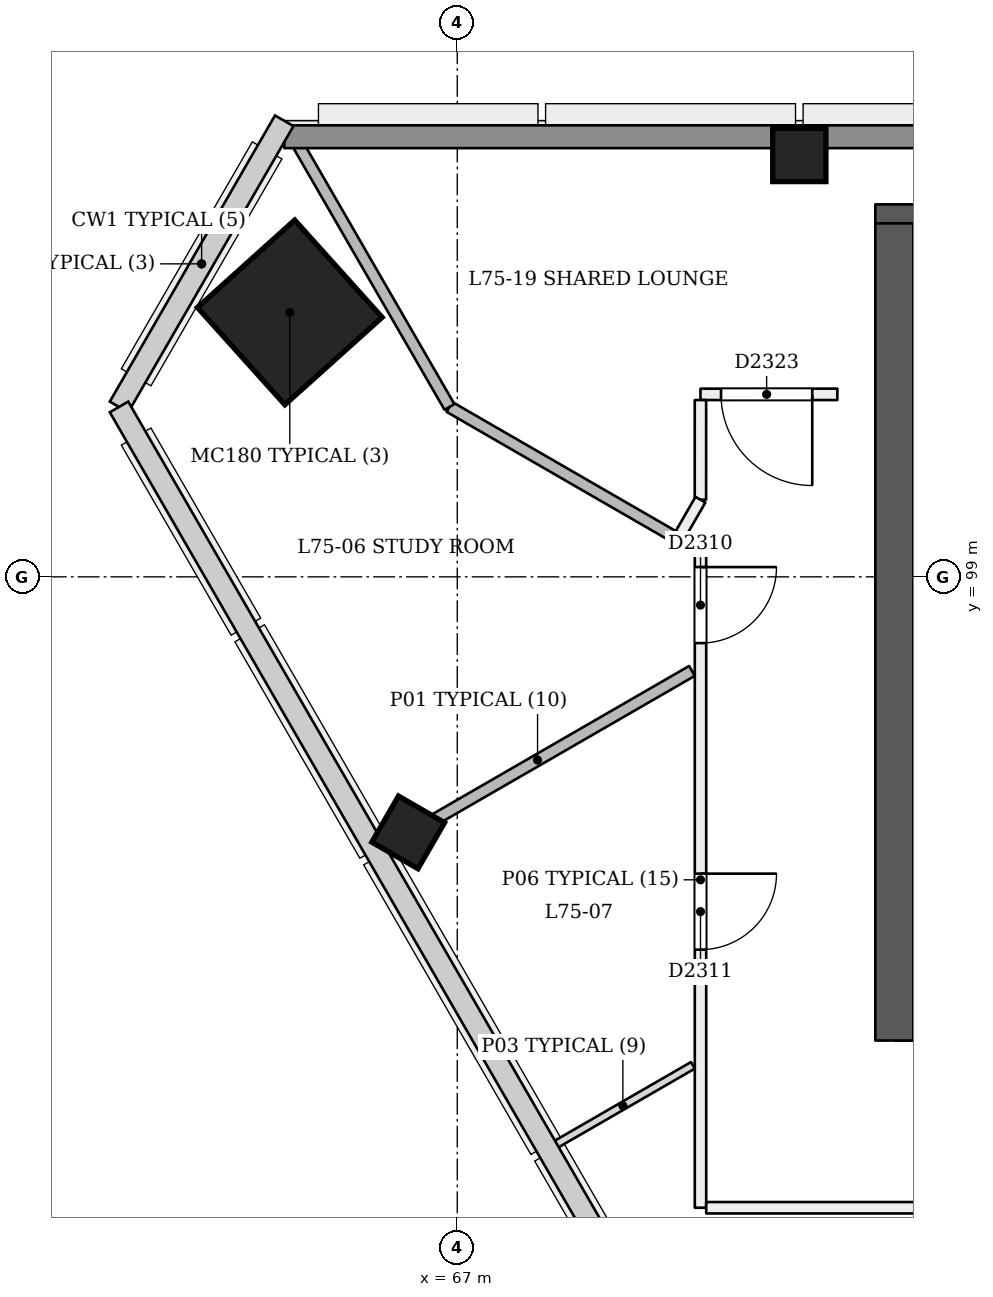
"""IFC4 building model, lengths in metres.
Left out: names, types, materials, properties, quantities, classifications, styles, units other than length and angle.
Written with IfcOpenShell. Run it as: python <this file> out.ifc"""

import sys

from ifc_helpers import new_model, si_unit, direction, frame, frame_2d, origin, origin_2d, place, context, subcontext, project, spatial, rectangle, extrude, element, fill, save


model = new_model("IFC4")
c1 = context("Model", 3, precision=1e-05, world=origin(), true_north=direction((0.0, 1.0)))
c2 = subcontext(c1, "Body", "Model", "MODEL_VIEW")
j1 = project(units=[si_unit("LENGTHUNIT", "METRE"), si_unit("PLANEANGLEUNIT", "RADIAN")], contexts=[c1])
p1 = place(None, origin())
s1 = spatial("IfcSite", under=j1, at=p1, CompositionType="ELEMENT")
p2 = place(p1, origin())
s2 = spatial("IfcBuilding", under=s1, at=p2, CompositionType="ELEMENT")
p3 = place(p2, frame((0.0, 0.0, 291.4)))
s3 = spatial("IfcBuildingStorey", under=s2, at=p3, CompositionType="ELEMENT", Elevation=291.4)
p4 = place(p3, frame((72.75, 93.15, 0.0), z_axis=(0.0, 0.0, 1.0), x_axis=(1.0, 0.0, 0.0)))
e1 = element("IfcWall", 1, at=p4, inside=s3, PredefinedType="SHEAR", context=c2, shape_type="SweptSolid", body=[
    extrude(rectangle(XDim=24.75, YDim=0.5, at=frame_2d((12.375, 0.0))), origin(), (0.0, 0.0, 1.0), 3.6),
])
p5 = place(p4, frame((1.05, 0.0, 0.0)))
e2 = element("IfcOpeningElement", 2, at=p5, cuts=e1, PredefinedType="OPENING", context=c2, shape_type="SweptSolid", body=[
    extrude(rectangle(XDim=1.2, YDim=2.1, at=frame_2d((0.6, 1.05))), frame((0.0, 0.26, 0.0), z_axis=(0.0, -1.0, 0.0), x_axis=(1.0, 0.0, 0.0)), (0.0, 0.0, 1.0), 0.521),
])
p6 = place(p4, frame((3.25, 0.0, 0.0)))
e3 = element("IfcOpeningElement", 3, at=p6, cuts=e1, PredefinedType="OPENING", context=c2, shape_type="SweptSolid", body=[
    extrude(rectangle(XDim=1.2, YDim=2.1, at=frame_2d((0.6, 1.05))), frame((0.0, 0.26, 0.0), z_axis=(0.0, -1.0, 0.0), x_axis=(1.0, 0.0, 0.0)), (0.0, 0.0, 1.0), 0.521),
])
p7 = place(p4, frame((13.25, 0.0, 0.0)))
e4 = element("IfcOpeningElement", 4, at=p7, cuts=e1, PredefinedType="OPENING", context=c2, shape_type="SweptSolid", body=[
    extrude(rectangle(XDim=1.2, YDim=2.1, at=frame_2d((0.6, 1.05))), frame((0.0, 0.26, 0.0), z_axis=(0.0, -1.0, 0.0), x_axis=(1.0, 0.0, 0.0)), (0.0, 0.0, 1.0), 0.521),
])
p8 = place(p4, frame((16.663, 0.0, 0.0)))
e5 = element("IfcOpeningElement", 5, at=p8, cuts=e1, PredefinedType="OPENING", context=c2, shape_type="SweptSolid", body=[
    extrude(rectangle(XDim=1.0, YDim=2.1, at=frame_2d((0.5, 1.05))), frame((0.0, 0.26, 0.0), z_axis=(0.0, -1.0, 0.0), x_axis=(1.0, 0.0, 0.0)), (0.0, 0.0, 1.0), 0.521),
])
p9 = place(p4, frame((20.55, 0.0, 0.0)))
e6 = element("IfcOpeningElement", 6, at=p9, cuts=e1, PredefinedType="OPENING", context=c2, shape_type="SweptSolid", body=[
    extrude(rectangle(XDim=1.0, YDim=2.1, at=frame_2d((0.5, 1.05))), frame((0.0, 0.26, 0.0), z_axis=(0.0, -1.0, 0.0), x_axis=(1.0, 0.0, 0.0)), (0.0, 0.0, 1.0), 0.521),
])
p10 = place(p4, frame((22.988, 0.0, 0.0)))
e7 = element("IfcOpeningElement", 7, at=p10, cuts=e1, PredefinedType="OPENING", context=c2, shape_type="SweptSolid", body=[
    extrude(rectangle(XDim=1.0, YDim=2.1, at=frame_2d((0.5, 1.05))), frame((0.0, 0.26, 0.0), z_axis=(0.0, -1.0, 0.0), x_axis=(1.0, 0.0, 0.0)), (0.0, 0.0, 1.0), 0.521),
])
p11 = place(p3, frame((97.25, 103.65, 0.0), z_axis=(0.0, 0.0, 1.0), x_axis=(-1.0, 0.0, 0.0)))
e8 = element("IfcWall", 8, at=p11, inside=s3, PredefinedType="SHEAR", context=c2, shape_type="SweptSolid", body=[
    extrude(rectangle(XDim=24.75, YDim=0.5, at=frame_2d((12.375, 0.0))), origin(), (0.0, 0.0, 1.0), 3.6),
])
p12 = place(p3, frame((72.75, 103.65, 0.0), z_axis=(0.0, 0.0, 1.0), x_axis=(0.0, -1.0, 0.0)))
e9 = element("IfcWall", 9, at=p12, inside=s3, PredefinedType="SHEAR", context=c2, shape_type="SweptSolid", body=[
    extrude(rectangle(XDim=10.75, YDim=0.5, at=frame_2d((5.375, 0.0))), origin(), (0.0, 0.0, 1.0), 3.6),
])
p13 = place(p3, frame((64.763, 102.468, 0.0), z_axis=(0.028334084323, 0.009218745139, 0.999555998633), x_axis=(-0.865481825265, 0.500544223539, 0.019917088604)))
e10 = element("IfcColumn", 10, at=p13, inside=s3, PredefinedType="COLUMN", context=c2, shape_type="SweptSolid", body=[
    extrude(rectangle(XDim=1.72, YDim=1.72, at=origin_2d()), origin(), (0.0, 0.0, 1.0), 3.602),
])
p14 = place(p3, frame((71.5, 104.55, 0.0), z_axis=(0.0, 0.0, 1.0), x_axis=(1.0, 0.0, 0.0)))
e11 = element("IfcColumn", 11, at=p14, inside=s3, PredefinedType="COLUMN", context=c2, shape_type="SweptSolid", body=[
    extrude(rectangle(XDim=0.7, YDim=0.7, at=origin_2d()), origin(), (0.0, 0.0, 1.0), 3.6),
])
p15 = place(p3, frame((66.328, 95.592, 0.0), z_axis=(0.022216970636, 0.038436722204, 0.999014026229), x_axis=(-0.865846877157, -0.498829583864, 0.038447777287)))
e12 = element("IfcColumn", 12, at=p15, inside=s3, PredefinedType="COLUMN", context=c2, shape_type="SweptSolid", body=[
    extrude(rectangle(XDim=0.7, YDim=0.7, at=origin_2d()), origin(), (0.0, 0.0, 1.0), 3.582),
])
p16 = place(p3, frame((70.2, 99.328, 0.0), z_axis=(0.0, 0.0, 1.0), x_axis=(0.0, -1.0, 0.0)))
e13 = element("IfcWall", 13, at=p16, inside=s3, PredefinedType="PARTITIONING", context=c2, shape_type="SweptSolid", body=[
    extrude(rectangle(XDim=8.628, YDim=0.15, at=frame_2d((4.314, 0.0))), origin(), (0.0, 0.0, 1.0), 3.2),
])
p17 = place(p16, frame((0.2, 0.0, 0.0)))
e14 = element("IfcOpeningElement", 14, at=p17, cuts=e13, PredefinedType="OPENING", context=c2, shape_type="SweptSolid", body=[
    extrude(rectangle(XDim=1.0, YDim=2.1, at=frame_2d((0.5, 1.05))), frame((0.0, 0.085, 0.0), z_axis=(0.0, -1.0, 0.0), x_axis=(1.0, 0.0, 0.0)), (0.0, 0.0, 1.0), 0.171),
])
p18 = place(p16, frame((4.233, 0.0, 0.0)))
e15 = element("IfcOpeningElement", 15, at=p18, cuts=e13, PredefinedType="OPENING", context=c2, shape_type="SweptSolid", body=[
    extrude(rectangle(XDim=1.0, YDim=2.1, at=frame_2d((0.5, 1.05))), frame((0.0, 0.085, 0.0), z_axis=(0.0, -1.0, 0.0), x_axis=(1.0, 0.0, 0.0)), (0.0, 0.0, 1.0), 0.171),
])
p19 = place(p3, frame((70.275, 90.7, 0.0), z_axis=(0.0, 0.0, 1.0), x_axis=(1.0, 0.0, 0.0)))
e16 = element("IfcWall", 16, at=p19, inside=s3, PredefinedType="PARTITIONING", context=c2, shape_type="SweptSolid", body=[
    extrude(rectangle(XDim=5.863, YDim=0.15, at=frame_2d((2.932, 0.0))), origin(), (0.0, 0.0, 1.0), 3.2),
])
p20 = place(p3, frame((72.0, 101.401, 0.0), z_axis=(0.0, 0.0, 1.0), x_axis=(-1.0, 0.0, 0.0)))
e17 = element("IfcWall", 17, at=p20, inside=s3, PredefinedType="PARTITIONING", context=c2, shape_type="SweptSolid", body=[
    extrude(rectangle(XDim=1.801, YDim=0.15, at=frame_2d((0.9, 0.0))), origin(), (0.0, 0.0, 1.0), 3.2),
])
p21 = place(p20, frame((0.33, 0.0, 0.0)))
e18 = element("IfcOpeningElement", 18, at=p21, cuts=e17, PredefinedType="OPENING", context=c2, shape_type="SweptSolid", body=[
    extrude(rectangle(XDim=1.2, YDim=2.1, at=frame_2d((0.6, 1.05))), frame((0.0, 0.085, 0.0), z_axis=(0.0, -1.0, 0.0), x_axis=(1.0, 0.0, 0.0)), (0.0, 0.0, 1.0), 0.171),
])
p22 = place(p3, frame((70.199, 101.326, 0.0), z_axis=(0.0, 0.0, 1.0), x_axis=(-0.000372578216, -0.999999930593, 0.0)))
e19 = element("IfcWall", 19, at=p22, inside=s3, PredefinedType="PARTITIONING", context=c2, shape_type="SweptSolid", body=[
    extrude(rectangle(XDim=1.311, YDim=0.15, at=frame_2d((0.655, 0.0))), origin(), (0.0, 0.0, 1.0), 3.2),
])
p23 = place(p3, frame((70.199, 100.015, 0.0), z_axis=(0.0, 0.0, 1.0), x_axis=(-0.499830999225, -0.866122954443, 0.0)))
e20 = element("IfcWall", 20, at=p23, inside=s3, PredefinedType="PARTITIONING", context=c2, shape_type="SweptSolid", body=[
    extrude(rectangle(XDim=0.519, YDim=0.15, at=frame_2d((0.26, 0.0))), origin(), (0.0, 0.0, 1.0), 3.2),
])
p24 = place(p3, frame((66.025, 95.417, 0.0), z_axis=(0.0, 0.0, 1.0), x_axis=(0.86600531219, 0.500034798048, 0.0)))
e21 = element("IfcWall", 21, at=p24, inside=s3, PredefinedType="PARTITIONING", context=c2, shape_type="SweptSolid", body=[
    extrude(rectangle(XDim=4.691, YDim=0.15, at=frame_2d((2.346, 0.0))), origin(), (0.0, 0.0, 1.0), 2.7),
])
p25 = place(p3, frame((69.902, 99.5, 0.0), z_axis=(0.0, 0.0, 1.0), x_axis=(-0.866026229868, 0.499998569178, 0.0)))
e22 = element("IfcWall", 22, at=p25, inside=s3, PredefinedType="PARTITIONING", context=c2, shape_type="SweptSolid", body=[
    extrude(rectangle(XDim=3.47, YDim=0.15, at=frame_2d((1.735, 0.0))), origin(), (0.0, 0.0, 1.0), 3.2),
])
p26 = place(p3, frame((66.897, 101.235, 0.0), z_axis=(0.0, 0.0, 1.0), x_axis=(-0.499998808253, 0.866026091839, 0.0)))
e23 = element("IfcWall", 23, at=p26, inside=s3, PredefinedType="PARTITIONING", context=c2, shape_type="SweptSolid", body=[
    extrude(rectangle(XDim=4.231, YDim=0.15, at=frame_2d((2.116, 0.0))), origin(), (0.0, 0.0, 1.0), 2.7),
])
p27 = place(p3, frame((68.257, 91.51, 0.0), z_axis=(0.0, 0.0, 1.0), x_axis=(0.866017446268, 0.50001378257, 0.0)))
e24 = element("IfcWall", 24, at=p27, inside=s3, PredefinedType="PARTITIONING", context=c2, shape_type="SweptSolid", body=[
    extrude(rectangle(XDim=2.128, YDim=0.1, at=frame_2d((1.064, 0.0))), origin(), (0.0, 0.0, 1.0), 2.7),
])
p28 = place(p3, frame((64.723, 104.79, 0.0), z_axis=(0.0, 0.0, 1.0), x_axis=(1.0, 0.0, 0.0)))
e25 = element("IfcWall", 25, at=p28, inside=s3, PredefinedType="SOLIDWALL", context=c2, shape_type="SweptSolid", body=[
    extrude(rectangle(XDim=40.553, YDim=0.3, at=frame_2d((20.277, 0.0))), origin(), (0.0, 0.0, 1.0), 2.7),
])
p29 = place(p17, origin())
e26 = element("IfcDoor", 26, at=p29, inside=s3, OperationType="SINGLE_SWING_LEFT", PredefinedType="NOTDEFINED", context=c2, shape_type="SweptSolid", body=[
    extrude(rectangle(XDim=1.0, YDim=2.1, at=frame_2d((0.5, 1.05))), frame((0.0, 0.025, 0.0), z_axis=(0.0, -1.0, 0.0), x_axis=(1.0, 0.0, 0.0)), (0.0, 0.0, 1.0), 0.05),
])
fill(e14, e26)
p30 = place(p18, origin())
e27 = element("IfcDoor", 27, at=p30, inside=s3, OperationType="SINGLE_SWING_LEFT", PredefinedType="NOTDEFINED", context=c2, shape_type="SweptSolid", body=[
    extrude(rectangle(XDim=1.0, YDim=2.1, at=frame_2d((0.5, 1.05))), frame((0.0, 0.025, 0.0), z_axis=(0.0, -1.0, 0.0), x_axis=(1.0, 0.0, 0.0)), (0.0, 0.0, 1.0), 0.05),
])
fill(e15, e27)
p31 = place(p21, origin())
e28 = element("IfcDoor", 28, at=p31, inside=s3, OperationType="SINGLE_SWING_LEFT", PredefinedType="NOTDEFINED", context=c2, shape_type="SweptSolid", body=[
    extrude(rectangle(XDim=1.2, YDim=2.1, at=frame_2d((0.6, 1.05))), frame((0.0, 0.025, 0.0), z_axis=(0.0, -1.0, 0.0), x_axis=(1.0, 0.0, 0.0)), (0.0, 0.0, 1.0), 0.05),
])
fill(e18, e28)
save(model, sys.argv[1])
